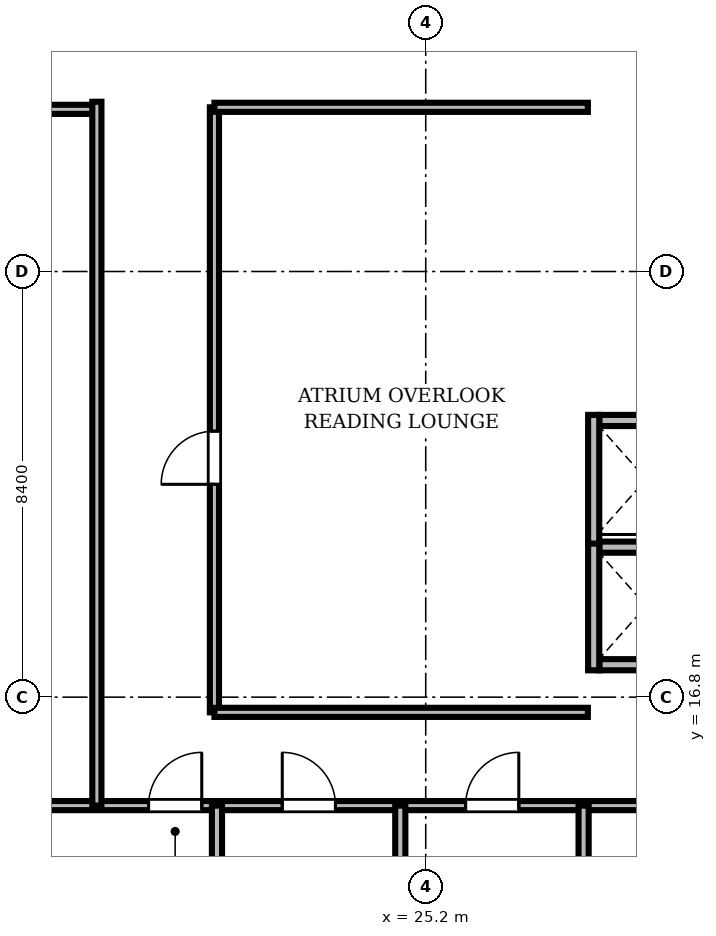
"""IFC4 building model, lengths in metres.
Left out: names, types, materials, properties, quantities, classifications, styles, units other than length and angle.
Written with IfcOpenShell. Run it as: python <this file> out.ifc"""

import sys

from ifc_helpers import new_model, si_unit, direction, frame, frame_2d, origin, place, context, subcontext, project, spatial, rectangle, extrude, source, transform, mapped, element, fill, save


model = new_model("IFC4")
c1 = context("Model", 3, precision=1e-05, world=origin(), true_north=direction((0.0, 1.0)))
c2 = subcontext(c1, "Body", "Model", "MODEL_VIEW")
j1 = project(units=[si_unit("LENGTHUNIT", "METRE"), si_unit("PLANEANGLEUNIT", "RADIAN")], contexts=[c1])
p1 = place(None, origin())
s1 = spatial("IfcSite", under=j1, at=p1, CompositionType="ELEMENT")
p2 = place(p1, origin())
s2 = spatial("IfcBuilding", under=s1, at=p2, CompositionType="ELEMENT")
p3 = place(p2, frame((0.0, 0.0, 60.45)))
s3 = spatial("IfcBuildingStorey", under=s2, at=p3, CompositionType="ELEMENT", Elevation=60.45)
m1 = source(origin(), c2, "Body", "SweptSolid", [
    extrude(rectangle(XDim=1.85, YDim=0.22, at=frame_2d((0.925, 0.0))), origin(), (0.0, 0.0, 1.0), 3.41),
])
for number, where, z_axis, x_axis in (
    (1, (28.625, 17.44, 0.0), (0.0, 0.0, 1.0), (1.0, 0.0, 0.0)),
    (2, (28.625, 19.76, 0.0), (0.0, 0.0, 1.0), (1.0, 0.0, 0.0)),
):
    element("IfcWall", number, at=place(p3, frame(where, z_axis=z_axis, x_axis=x_axis)), inside=s3, PredefinedType="SOLIDWALL", context=c2, shape_type="MappedRepresentation", body=[
        mapped(m1, transform((0.0, 0.0, 0.0), scale=1.0)),
    ])
m2 = source(origin(), c2, "Body", "SweptSolid", [
    extrude(rectangle(XDim=2.54, YDim=0.22, at=frame_2d((1.27, 0.0))), origin(), (0.0, 0.0, 1.0), 3.41),
])
p4 = place(p3, frame((28.515, 17.33, 0.0), z_axis=(0.0, 0.0, 1.0), x_axis=(0.0, 1.0, 0.0)))
e3 = element("IfcWall", 3, at=p4, inside=s3, PredefinedType="SOLIDWALL", context=c2, shape_type="MappedRepresentation", body=[
    mapped(m2, transform((0.0, 0.0, 0.0), scale=1.0)),
])
p5 = place(p3, frame((28.625, 22.26, 0.0), z_axis=(0.0, 0.0, 1.0), x_axis=(1.0, 0.0, 0.0)))
e4 = element("IfcWall", 4, at=p5, inside=s3, PredefinedType="SOLIDWALL", context=c2, shape_type="MappedRepresentation", body=[
    mapped(m1, transform((0.0, 0.0, 0.0), scale=1.0)),
])
p6 = place(p3, frame((28.515, 19.83, 0.0), z_axis=(0.0, 0.0, 1.0), x_axis=(0.0, 1.0, 0.0)))
e5 = element("IfcWall", 5, at=p6, inside=s3, PredefinedType="SOLIDWALL", context=c2, shape_type="MappedRepresentation", body=[
    mapped(m2, transform((0.0, 0.0, 0.0), scale=1.0)),
])
m3 = source(origin(), c2, "Body", "SweptSolid", [
    extrude(rectangle(XDim=46.156, YDim=0.18, at=frame_2d((23.078, 0.0))), origin(), (0.0, 0.0, 1.0), 2.652),
])
p7 = place(p3, frame((2.422, 14.66, 0.0), z_axis=(0.0, 0.0, 1.0), x_axis=(1.0, 0.0, 0.0)))
e6 = element("IfcWall", 6, at=p7, inside=s3, PredefinedType="PARTITIONING", context=c2, shape_type="MappedRepresentation", body=[
    mapped(m3, transform((0.0, 0.0, 0.0), scale=1.0)),
])
m4 = source(origin(), c2, "Body", "SweptSolid", [
    extrude(rectangle(XDim=1.05, YDim=2.2, at=frame_2d((0.525, 1.1))), frame((0.0, 0.1, 0.0), z_axis=(0.0, -1.0, 0.0), x_axis=(1.0, 0.0, 0.0)), (0.0, 0.0, 1.0), 0.2),
])
p8 = place(p7, frame((17.308, 0.0, 0.0)))
e7 = element("IfcOpeningElement", 7, at=p8, cuts=e6, PredefinedType="OPENING", context=c2, shape_type="MappedRepresentation", body=[
    mapped(m4, transform((0.0, 0.0, 0.0), scale=1.0)),
])
p9 = place(p7, frame((19.947, 0.0, 0.0)))
e8 = element("IfcOpeningElement", 8, at=p9, cuts=e6, PredefinedType="OPENING", context=c2, shape_type="MappedRepresentation", body=[
    mapped(m4, transform((0.0, 0.0, 0.0), scale=1.0)),
])
p10 = place(p7, frame((23.565, 0.0, 0.0)))
e9 = element("IfcOpeningElement", 9, at=p10, cuts=e6, PredefinedType="OPENING", context=c2, shape_type="MappedRepresentation", body=[
    mapped(m4, transform((0.0, 0.0, 0.0), scale=1.0)),
])
p11 = place(p7, frame((27.183, 0.0, 0.0)))
e10 = element("IfcOpeningElement", 10, at=p11, cuts=e6, PredefinedType="OPENING", context=c2, shape_type="MappedRepresentation", body=[
    mapped(m4, transform((0.0, 0.0, 0.0), scale=1.0)),
])
p12 = place(p7, frame((30.801, 0.0, 0.0)))
e11 = element("IfcOpeningElement", 11, at=p12, cuts=e6, PredefinedType="OPENING", context=c2, shape_type="MappedRepresentation", body=[
    mapped(m4, transform((0.0, 0.0, 0.0), scale=1.0)),
])
p13 = place(p7, frame((34.419, 0.0, 0.0)))
e12 = element("IfcOpeningElement", 12, at=p13, cuts=e6, PredefinedType="OPENING", context=c2, shape_type="MappedRepresentation", body=[
    mapped(m4, transform((0.0, 0.0, 0.0), scale=1.0)),
])
p14 = place(p7, frame((38.037, 0.0, 0.0)))
e13 = element("IfcOpeningElement", 13, at=p14, cuts=e6, PredefinedType="OPENING", context=c2, shape_type="MappedRepresentation", body=[
    mapped(m4, transform((0.0, 0.0, 0.0), scale=1.0)),
])
p15 = place(p7, frame((42.727, 0.0, 0.0)))
e14 = element("IfcOpeningElement", 14, at=p15, cuts=e6, PredefinedType="OPENING", context=c2, shape_type="MappedRepresentation", body=[
    mapped(m4, transform((0.0, 0.0, 0.0), scale=1.0)),
])
m5 = source(origin(), c2, "Body", "SweptSolid", [
    extrude(rectangle(XDim=11.94, YDim=0.18, at=frame_2d((5.97, 0.0))), origin(), (0.0, 0.0, 1.0), 2.802),
])
p16 = place(p3, frame((21.03, 16.5, 0.0), z_axis=(0.0, 0.0, 1.0), x_axis=(0.0, 1.0, 0.0)))
e15 = element("IfcWall", 15, at=p16, inside=s3, PredefinedType="PARTITIONING", context=c2, shape_type="MappedRepresentation", body=[
    mapped(m5, transform((0.0, 0.0, 0.0), scale=1.0)),
])
p17 = place(p16, frame((4.5, 0.0, 0.0)))
e16 = element("IfcOpeningElement", 16, at=p17, cuts=e15, PredefinedType="OPENING", context=c2, shape_type="MappedRepresentation", body=[
    mapped(m4, transform((0.0, 0.0, 0.0), scale=1.0)),
])
m6 = source(origin(), c2, "Body", "SweptSolid", [
    extrude(rectangle(XDim=16.48, YDim=0.18, at=frame_2d((8.24, 0.0))), origin(), (0.0, 0.0, 1.0), 2.652),
])
p18 = place(p3, frame((2.23, 28.4, 0.0), z_axis=(0.0, 0.0, 1.0), x_axis=(1.0, 0.0, 0.0)))
e17 = element("IfcWall", 17, at=p18, inside=s3, PredefinedType="PARTITIONING", context=c2, shape_type="MappedRepresentation", body=[
    mapped(m6, transform((0.0, 0.0, 0.0), scale=1.0)),
])
m7 = source(origin(), c2, "Body", "SweptSolid", [
    extrude(rectangle(XDim=13.89, YDim=0.18, at=frame_2d((6.945, 0.0))), origin(), (0.0, 0.0, 1.0), 2.802),
])
p19 = place(p3, frame((18.71, 14.66, 0.0), z_axis=(0.0, 0.0, 1.0), x_axis=(0.0, 1.0, 0.0)))
e18 = element("IfcWall", 18, at=p19, inside=s3, PredefinedType="PARTITIONING", context=c2, shape_type="MappedRepresentation", body=[
    mapped(m7, transform((0.0, 0.0, 0.0), scale=1.0)),
])
m8 = source(origin(), c2, "Body", "SweptSolid", [
    extrude(rectangle(XDim=12.538, YDim=0.2, at=frame_2d((6.269, 0.0))), origin(), (0.0, 0.0, 1.0), 2.652),
])
p20 = place(p3, frame((21.08, 2.122, 0.0), z_axis=(0.0, 0.0, 1.0), x_axis=(0.0, 1.0, 0.0)))
e19 = element("IfcWall", 19, at=p20, inside=s3, PredefinedType="PARTITIONING", context=c2, shape_type="MappedRepresentation", body=[
    mapped(m8, transform((0.0, 0.0, 0.0), scale=1.0)),
])
m9 = source(origin(), c2, "Body", "SweptSolid", [
    extrude(rectangle(XDim=12.73, YDim=0.2, at=frame_2d((6.365, 0.0))), origin(), (0.0, 0.0, 1.0), 2.652),
])
for number, where, z_axis, x_axis in (
    (20, (24.698, 1.93, 0.0), (0.0, 0.0, 1.0), (0.0, 1.0, 0.0)),
    (21, (28.316, 1.93, 0.0), (0.0, 0.0, 1.0), (0.0, 1.0, 0.0)),
):
    element("IfcWall", number, at=place(p3, frame(where, z_axis=z_axis, x_axis=x_axis)), inside=s3, PredefinedType="PARTITIONING", context=c2, shape_type="MappedRepresentation", body=[
        mapped(m9, transform((0.0, 0.0, 0.0), scale=1.0)),
    ])
m10 = source(origin(), c2, "Body", "SweptSolid", [
    extrude(rectangle(XDim=7.37, YDim=0.18, at=frame_2d((3.685, 0.0))), origin(), (0.0, 0.0, 1.0), 2.802),
])
p21 = place(p3, frame((21.03, 16.5, 0.0), z_axis=(0.0, 0.0, 1.0), x_axis=(1.0, 0.0, 0.0)))
e22 = element("IfcWall", 22, at=p21, inside=s3, PredefinedType="PARTITIONING", context=c2, shape_type="MappedRepresentation", body=[
    mapped(m10, transform((0.0, 0.0, 0.0), scale=1.0)),
])
m11 = source(origin(), c2, "Body", "SweptSolid", [
    extrude(rectangle(XDim=7.37, YDim=0.18, at=frame_2d((3.685, 0.0))), origin(), (0.0, 0.0, 1.0), 3.41),
])
p22 = place(p3, frame((21.03, 28.44, 0.0), z_axis=(0.0, 0.0, 1.0), x_axis=(1.0, 0.0, 0.0)))
e23 = element("IfcWall", 23, at=p22, inside=s3, PredefinedType="PARTITIONING", context=c2, shape_type="MappedRepresentation", body=[
    mapped(m11, transform((0.0, 0.0, 0.0), scale=1.0)),
])
m12 = source(origin(), c2, "Body", "SweptSolid", [
    extrude(rectangle(XDim=1.05, YDim=2.2, at=frame_2d((0.525, 1.1))), frame((0.0, 0.025, 0.0), z_axis=(0.0, -1.0, 0.0), x_axis=(1.0, 0.0, 0.0)), (0.0, 0.0, 1.0), 0.05),
])
p23 = place(p8, origin())
e24 = element("IfcDoor", 24, at=p23, inside=s3, OperationType="SINGLE_SWING_RIGHT", PredefinedType="DOOR", context=c2, shape_type="MappedRepresentation", body=[
    mapped(m12, transform((0.0, 0.0, 0.0), scale=1.0)),
])
fill(e7, e24)
p24 = place(p9, origin())
e25 = element("IfcDoor", 25, at=p24, inside=s3, OperationType="SINGLE_SWING_LEFT", PredefinedType="DOOR", context=c2, shape_type="MappedRepresentation", body=[
    mapped(m12, transform((0.0, 0.0, 0.0), scale=1.0)),
])
fill(e8, e25)
p25 = place(p10, origin())
e26 = element("IfcDoor", 26, at=p25, inside=s3, OperationType="SINGLE_SWING_RIGHT", PredefinedType="DOOR", context=c2, shape_type="MappedRepresentation", body=[
    mapped(m12, transform((0.0, 0.0, 0.0), scale=1.0)),
])
fill(e9, e26)
p26 = place(p17, origin())
e27 = element("IfcDoor", 27, at=p26, inside=s3, OperationType="SINGLE_SWING_LEFT", PredefinedType="DOOR", context=c2, shape_type="MappedRepresentation", body=[
    mapped(m12, transform((0.0, 0.0, 0.0), scale=1.0)),
])
fill(e16, e27)
save(model, sys.argv[1])
